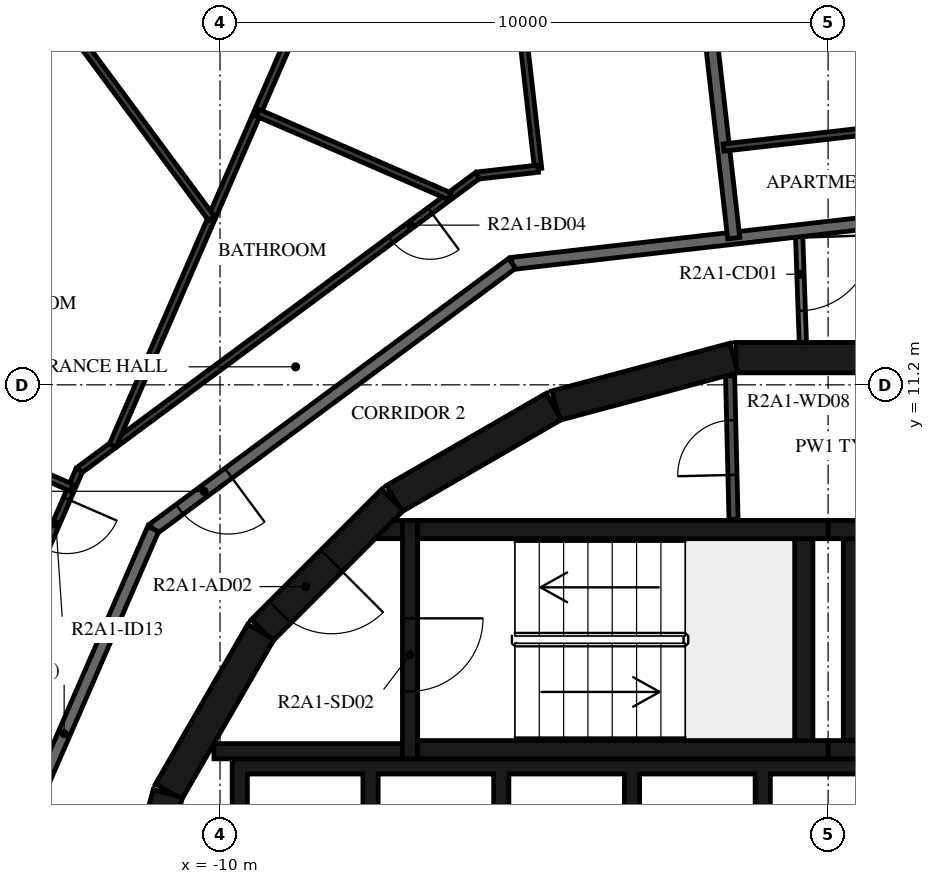
"""IFC4 building model, lengths in metres.
Left out: names, types, materials, properties, quantities, classifications, styles, units other than length and angle.
Written with IfcOpenShell. Run it as: python <this file> out.ifc"""

import sys

from ifc_helpers import new_model, si_unit, direction, frame, frame_2d, origin, place, context, subcontext, project, spatial, polyline, rectangle, outline, extrude, element, fill, save


model = new_model("IFC4")
c1 = context("Model", 3, precision=1e-05, world=origin(), true_north=direction((0.0, 1.0)))
c2 = subcontext(c1, "Body", "Model", "MODEL_VIEW")
j1 = project(units=[si_unit("LENGTHUNIT", "METRE"), si_unit("PLANEANGLEUNIT", "RADIAN")], contexts=[c1])
p1 = place(None, origin())
s1 = spatial("IfcSite", under=j1, at=p1, CompositionType="ELEMENT")
p2 = place(p1, origin())
s2 = spatial("IfcBuilding", under=s1, at=p2, CompositionType="ELEMENT")
p3 = place(p2, frame((0.0, 0.0, 80.2)))
s3 = spatial("IfcBuildingStorey", under=s2, at=p3, CompositionType="ELEMENT", Elevation=80.2)
for number, where, z_axis, x_axis in (
    (1, (1.516, 11.647, 0.0), (0.0, 0.0, 1.0), (-1.0, 0.0, 0.0)),
    (2, (-1.55, 11.643, 0.0), (0.0, 0.0, 1.0), (-0.966, -0.259, 0.0)),
    (3, (-4.51, 10.845, 0.0), (0.0, 0.0, 1.0), (-0.866, -0.5, 0.0)),
):
    element("IfcWall", number, at=place(p3, frame(where, z_axis=z_axis, x_axis=x_axis)), inside=s3, PredefinedType="SHEAR", context=c2, shape_type="SweptSolid", body=[
        extrude(rectangle(XDim=3.033, YDim=0.5, at=frame_2d((1.516, 0.0))), origin(), (0.0, 0.0, 1.0), 3.12),
    ])
p4 = place(p3, frame((-7.164, 9.308, 0.0), z_axis=(0.0, 0.0, 1.0), x_axis=(-0.707106781187, -0.707106781187, 0.0)))
e4 = element("IfcWall", 4, at=p4, inside=s3, PredefinedType="SHEAR", context=c2, shape_type="SweptSolid", body=[
    extrude(rectangle(XDim=3.032, YDim=0.5, at=frame_2d((1.516, 0.0))), origin(), (0.0, 0.0, 1.0), 3.12),
])
p5 = place(p4, frame((1.416, 0.0, 0.0)))
e5 = element("IfcOpeningElement", 5, at=p5, cuts=e4, PredefinedType="OPENING", context=c2, shape_type="SweptSolid", body=[
    extrude(rectangle(XDim=1.2, YDim=2.1, at=frame_2d((0.6, 1.05))), frame((0.0, 0.26, 0.0), z_axis=(0.0, -1.0, 0.0), x_axis=(1.0, 0.0, 0.0)), (0.0, 0.0, 1.0), 0.52),
])
for number, where, z_axis, x_axis in (
    (6, (-9.329, 7.137, 0.0), (0.0, 0.0, 1.0), (-0.5, -0.866, 0.0)),
    (7, (-10.858, 4.479, 0.0), (0.0, 0.0, 1.0), (-0.259, -0.966, 0.0)),
):
    element("IfcWall", number, at=place(p3, frame(where, z_axis=z_axis, x_axis=x_axis)), inside=s3, PredefinedType="SHEAR", context=c2, shape_type="SweptSolid", body=[
        extrude(rectangle(XDim=3.033, YDim=0.5, at=frame_2d((1.516, 0.0))), origin(), (0.0, 0.0, 1.0), 3.12),
    ])
for number, where, z_axis, x_axis in (
    (8, (0.0, 5.2, 0.0), (0.0, 0.0, 1.0), (1.0, 0.0, 0.0)),
    (9, (0.0, 8.82, 0.0), (0.0, 0.0, 1.0), (1.0, 0.0, 0.0)),
):
    element("IfcWall", number, at=place(p3, frame(where, z_axis=z_axis, x_axis=x_axis)), inside=s3, PredefinedType="SHEAR", context=c2, shape_type="SweptSolid", body=[
        extrude(rectangle(XDim=6.75, YDim=0.3, at=frame_2d((3.375, 0.0))), origin(), (0.0, 0.0, 1.0), 3.12),
    ])
p6 = place(p3, frame((0.4, 5.35, 0.0), z_axis=(0.0, 0.0, 1.0), x_axis=(0.0, 1.0, 0.0)))
e10 = element("IfcWall", 10, at=p6, inside=s3, PredefinedType="SHEAR", context=c2, shape_type="SweptSolid", body=[
    extrude(rectangle(XDim=3.32, YDim=0.3, at=frame_2d((1.66, 0.0))), origin(), (0.0, 0.0, 1.0), 3.12),
])
for number, where, z_axis, x_axis in (
    (11, (-6.75, 5.2, 0.0), (0.0, 0.0, 1.0), (1.0, 0.0, 0.0)),
    (12, (-6.75, 8.82, 0.0), (0.0, 0.0, 1.0), (1.0, 0.0, 0.0)),
):
    element("IfcWall", number, at=place(p3, frame(where, z_axis=z_axis, x_axis=x_axis)), inside=s3, PredefinedType="SHEAR", context=c2, shape_type="SweptSolid", body=[
        extrude(rectangle(XDim=6.75, YDim=0.3, at=frame_2d((3.375, 0.0))), origin(), (0.0, 0.0, 1.0), 3.12),
    ])
p7 = place(p3, frame((-0.4, 5.35, 0.0), z_axis=(0.0, 0.0, 1.0), x_axis=(0.0, 1.0, 0.0)))
e13 = element("IfcWall", 13, at=p7, inside=s3, PredefinedType="SHEAR", context=c2, shape_type="SweptSolid", body=[
    extrude(rectangle(XDim=3.32, YDim=0.3, at=frame_2d((1.66, 0.0))), origin(), (0.0, 0.0, 1.0), 3.12),
])
p8 = place(p3, frame((-6.875, 8.97, 0.0), z_axis=(0.0, 0.0, 1.0), x_axis=(0.0, -1.0, 0.0)))
e14 = element("IfcWall", 14, at=p8, inside=s3, PredefinedType="SHEAR", context=c2, shape_type="SweptSolid", body=[
    extrude(rectangle(XDim=3.92, YDim=0.25, at=frame_2d((1.96, 0.0))), origin(), (0.0, 0.0, 1.0), 3.12),
])
p9 = place(p8, frame((1.61, 0.0, 0.0)))
e15 = element("IfcOpeningElement", 15, at=p9, cuts=e14, PredefinedType="OPENING", context=c2, shape_type="SweptSolid", body=[
    extrude(rectangle(XDim=1.2, YDim=2.1, at=frame_2d((0.6, 1.05))), frame((0.0, 0.135, 0.0), z_axis=(0.0, -1.0, 0.0), x_axis=(1.0, 0.0, 0.0)), (0.0, 0.0, 1.0), 0.27),
])
p10 = place(p3, frame((-7.0, 5.175, 0.0), z_axis=(0.0, 0.0, 1.0), x_axis=(-1.0, 0.0, 0.0)))
e16 = element("IfcWall", 16, at=p10, inside=s3, PredefinedType="SHEAR", context=c2, shape_type="SweptSolid", body=[
    extrude(rectangle(XDim=3.1, YDim=0.25, at=frame_2d((1.55, 0.0))), origin(), (0.0, 0.0, 1.0), 3.12),
])
p11 = place(p3, origin())
e17 = element("IfcWall", 17, at=p11, inside=s3, PredefinedType="SHEAR", context=c2, shape_type="SweptSolid", body=[
    extrude(outline(polyline([(-7.148, 8.97), (-7.0, 8.97), (-7.0, 8.67), (-7.448, 8.67), (-7.148, 8.97)])), origin(), (0.0, 0.0, 1.0), 3.12),
])
p12 = place(p3, origin())
e18 = element("IfcWall", 18, at=p12, inside=s3, PredefinedType="SHEAR", context=c2, shape_type="SweptSolid", body=[
    extrude(outline(polyline([(-9.55, 4.8), (-7.65, 4.8), (-7.65, 1.9), (-7.4, 1.9), (-7.4, 4.8), (-5.5, 4.8), (-5.5, 1.9), (-5.25, 1.9), (-5.25, 4.8), (-3.35, 4.8), (-3.35, 1.9), (-3.1, 1.9), (-3.1, 4.8), (-1.2, 4.8), (-1.2, 1.9), (-0.95, 1.9), (-0.95, 4.8), (3.1, 4.8), (3.1, 1.9), (3.35, 1.9), (3.35, 4.8), (5.25, 4.8), (5.25, 1.9), (5.5, 1.9), (5.5, 4.8), (7.4, 4.8), (7.4, 1.9), (7.65, 1.9), (7.65, 4.8), (9.55, 4.8), (9.55, 1.9), (9.8, 1.9), (9.8, 4.8), (9.8, 5.05), (-9.8, 5.05), (-9.8, 4.8), (-9.8, 1.9), (-9.55, 1.9), (-9.55, 4.8)])), origin(), (0.0, 0.0, 1.0), 3.12),
])
p13 = place(p3, frame((-1.555, 8.99, 0.0), z_axis=(0.0, 0.0, 1.0), x_axis=(-0.024125549686, 0.999708936567, 0.0)))
e19 = element("IfcWall", 19, at=p13, inside=s3, PredefinedType="PARTITIONING", context=c2, shape_type="SweptSolid", body=[
    extrude(rectangle(XDim=2.358, YDim=0.15, at=frame_2d((1.179, 0.0))), origin(), (0.0, 0.0, 1.0), 3.12),
])
p14 = place(p13, frame((0.729, 0.0, 0.0)))
e20 = element("IfcOpeningElement", 20, at=p14, cuts=e19, PredefinedType="OPENING", context=c2, shape_type="SweptSolid", body=[
    extrude(rectangle(XDim=0.9, YDim=2.1, at=frame_2d((0.45, 1.05))), frame((0.0, 0.085, 0.0), z_axis=(0.0, -1.0, 0.0), x_axis=(1.0, 0.0, 0.0)), (0.0, 0.0, 1.0), 0.17),
])
p15 = place(p3, frame((-0.479, 13.734, 0.0), z_axis=(0.0, 0.0, 1.0), x_axis=(0.034805430832, -0.999394107439, 0.0)))
e21 = element("IfcWall", 21, at=p15, inside=s3, PredefinedType="PARTITIONING", context=c2, shape_type="SweptSolid", body=[
    extrude(rectangle(XDim=1.838, YDim=0.12, at=frame_2d((0.919, 0.0))), origin(), (0.0, 0.0, 1.0), 3.12),
])
p16 = place(p15, frame((0.115, 0.0, 0.0)))
e22 = element("IfcOpeningElement", 22, at=p16, cuts=e21, PredefinedType="OPENING", context=c2, shape_type="SweptSolid", body=[
    extrude(rectangle(XDim=1.2, YDim=2.1, at=frame_2d((0.6, 1.05))), frame((0.0, 0.07, 0.0), z_axis=(0.0, -1.0, 0.0), x_axis=(1.0, 0.0, 0.0)), (0.0, 0.0, 1.0), 0.14),
])
p17 = place(p3, frame((2.096, 14.028, 0.0), z_axis=(0.0, 0.0, 1.0), x_axis=(-0.993569170114, -0.113226782163, 0.0)))
e23 = element("IfcWall", 23, at=p17, inside=s3, PredefinedType="STANDARD", context=c2, shape_type="SweptSolid", body=[
    extrude(rectangle(XDim=7.342, YDim=0.2, at=frame_2d((3.671, 0.0))), origin(), (0.0, 0.0, 1.0), 3.12),
])
p18 = place(p3, frame((-5.198, 13.196, 0.0), z_axis=(0.0, 0.0, 1.0), x_axis=(-0.803869883159, -0.594805187394, 0.0)))
e24 = element("IfcWall", 24, at=p18, inside=s3, PredefinedType="STANDARD", context=c2, shape_type="SweptSolid", body=[
    extrude(rectangle(XDim=7.342, YDim=0.2, at=frame_2d((3.671, 0.0))), origin(), (0.0, 0.0, 1.0), 3.12),
])
p19 = place(p18, frame((5.8, 0.0, 0.0)))
e25 = element("IfcOpeningElement", 25, at=p19, cuts=e24, PredefinedType="OPENING", context=c2, shape_type="SweptSolid", body=[
    extrude(rectangle(XDim=1.0, YDim=2.1, at=frame_2d((0.5, 1.05))), frame((0.0, 0.11, 0.0), z_axis=(0.0, -1.0, 0.0), x_axis=(1.0, 0.0, 0.0)), (0.0, 0.0, 1.0), 0.22),
])
p20 = place(p3, frame((-11.1, 8.829, 0.0), z_axis=(0.0, 0.0, 1.0), x_axis=(-0.398741918631, -0.917063183388, 0.0)))
e26 = element("IfcWall", 26, at=p20, inside=s3, PredefinedType="STANDARD", context=c2, shape_type="SweptSolid", body=[
    extrude(rectangle(XDim=7.342, YDim=0.2, at=frame_2d((3.671, 0.0))), origin(), (0.0, 0.0, 1.0), 3.12),
])
p21 = place(p3, frame((-2.385, 20.92, 0.0), z_axis=(0.0, 0.0, 1.0), x_axis=(0.113177776247, -0.993574753586, 0.0)))
e27 = element("IfcWall", 27, at=p21, inside=s3, PredefinedType="STANDARD", context=c2, shape_type="SweptSolid", body=[
    extrude(rectangle(XDim=7.356, YDim=0.2, at=frame_2d((3.678, 0.0))), origin(), (0.0, 0.0, 1.0), 3.12),
])
p22 = place(p3, frame((2.326, 15.563, 0.0), z_axis=(0.0, 0.0, 1.0), x_axis=(-0.993575109804, -0.113174649008, 0.0)))
e28 = element("IfcWall", 28, at=p22, inside=s3, PredefinedType="PARTITIONING", context=c2, shape_type="SweptSolid", body=[
    extrude(rectangle(XDim=4.073, YDim=0.12, at=frame_2d((2.036, 0.0))), origin(), (0.0, 0.0, 1.0), 3.12),
])
p23 = place(p3, frame((0.498, 24.306, 0.0), z_axis=(0.0, 0.0, 1.0), x_axis=(0.594826266513, -0.803854285718, 0.0)))
e29 = element("IfcWall", 29, at=p23, inside=s3, PredefinedType="PARTITIONING", context=c2, shape_type="SweptSolid", body=[
    extrude(rectangle(XDim=11.875, YDim=0.12, at=frame_2d((5.938, 0.0))), origin(), (0.0, 0.0, 1.0), 3.12),
])
p24 = place(p23, frame((8.26, 0.0, 0.0)))
e30 = element("IfcOpeningElement", 30, at=p24, cuts=e29, PredefinedType="OPENING", context=c2, shape_type="SweptSolid", body=[
    extrude(rectangle(XDim=0.9, YDim=2.1, at=frame_2d((0.45, 1.05))), frame((0.0, 0.07, 0.0), z_axis=(0.0, -1.0, 0.0), x_axis=(1.0, 0.0, 0.0)), (0.0, 0.0, 1.0), 0.14),
])
p25 = place(p23, frame((3.094, 0.0, 0.0)))
e31 = element("IfcOpeningElement", 31, at=p25, cuts=e29, PredefinedType="OPENING", context=c2, shape_type="SweptSolid", body=[
    extrude(rectangle(XDim=0.9, YDim=2.1, at=frame_2d((0.45, 1.05))), frame((0.0, 0.07, 0.0), z_axis=(0.0, -1.0, 0.0), x_axis=(1.0, 0.0, 0.0)), (0.0, 0.0, 1.0), 0.14),
])
p26 = place(p3, frame((-5.584, 21.908, 0.0), z_axis=(0.0, 0.0, 1.0), x_axis=(0.113192725021, -0.993573050662, 0.0)))
e32 = element("IfcWall", 32, at=p26, inside=s3, PredefinedType="PARTITIONING", context=c2, shape_type="SweptSolid", body=[
    extrude(rectangle(XDim=7.2, YDim=0.12, at=frame_2d((3.6, 0.0))), origin(), (0.0, 0.0, 1.0), 3.12),
])
p27 = place(p26, frame((0.12, 0.0, 0.0)))
e33 = element("IfcOpeningElement", 33, at=p27, cuts=e32, PredefinedType="OPENING", context=c2, shape_type="SweptSolid", body=[
    extrude(rectangle(XDim=0.9, YDim=2.1, at=frame_2d((0.45, 1.05))), frame((0.0, 0.07, 0.0), z_axis=(0.0, -1.0, 0.0), x_axis=(1.0, 0.0, 0.0)), (0.0, 0.0, 1.0), 0.14),
])
p28 = place(p26, frame((1.658, 0.0, 0.0)))
e34 = element("IfcOpeningElement", 34, at=p28, cuts=e32, PredefinedType="OPENING", context=c2, shape_type="SweptSolid", body=[
    extrude(rectangle(XDim=0.9, YDim=2.1, at=frame_2d((0.45, 1.05))), frame((0.0, 0.07, 0.0), z_axis=(0.0, -1.0, 0.0), x_axis=(1.0, 0.0, 0.0)), (0.0, 0.0, 1.0), 0.14),
])
p29 = place(p3, frame((-4.769, 14.755, 0.0), z_axis=(0.0, 0.0, 1.0), x_axis=(-0.993568649539, -0.113231350131, 0.0)))
e35 = element("IfcWall", 35, at=p29, inside=s3, PredefinedType="PARTITIONING", context=c2, shape_type="SweptSolid", body=[
    extrude(rectangle(XDim=1.005, YDim=0.12, at=frame_2d((0.502, 0.0))), origin(), (0.0, 0.0, 1.0), 3.12),
])
p30 = place(p3, frame((-5.767, 14.641, 0.0), z_axis=(0.0, 0.0, 1.0), x_axis=(-0.803853364238, -0.594827511807, 0.0)))
e36 = element("IfcWall", 36, at=p30, inside=s3, PredefinedType="PARTITIONING", context=c2, shape_type="SweptSolid", body=[
    extrude(rectangle(XDim=8.146, YDim=0.12, at=frame_2d((4.073, 0.0))), origin(), (0.0, 0.0, 1.0), 3.12),
])
p31 = place(p30, frame((0.97, 0.0, 0.0)))
e37 = element("IfcOpeningElement", 37, at=p31, cuts=e36, PredefinedType="OPENING", context=c2, shape_type="SweptSolid", body=[
    extrude(rectangle(XDim=0.8, YDim=2.1, at=frame_2d((0.4, 1.05))), frame((0.0, 0.07, 0.0), z_axis=(0.0, -1.0, 0.0), x_axis=(1.0, 0.0, 0.0)), (0.0, 0.0, 1.0), 0.14),
])
p32 = place(p3, frame((-12.315, 9.796, 0.0), z_axis=(0.0, 0.0, 1.0), x_axis=(-0.398790200406, -0.917042188812, 0.0)))
e38 = element("IfcWall", 38, at=p32, inside=s3, PredefinedType="PARTITIONING", context=c2, shape_type="SweptSolid", body=[
    extrude(rectangle(XDim=2.646, YDim=0.12, at=frame_2d((1.323, 0.0))), origin(), (0.0, 0.0, 1.0), 3.12),
])
p33 = place(p32, frame((0.513, 0.0, 0.0)))
e39 = element("IfcOpeningElement", 39, at=p33, cuts=e38, PredefinedType="OPENING", context=c2, shape_type="SweptSolid", body=[
    extrude(rectangle(XDim=0.9, YDim=2.1, at=frame_2d((0.45, 1.05))), frame((0.0, 0.07, 0.0), z_axis=(0.0, -1.0, 0.0), x_axis=(1.0, 0.0, 0.0)), (0.0, 0.0, 1.0), 0.14),
])
p34 = place(p3, frame((-5.952, 23.571, 0.0), z_axis=(0.0, 0.0, 1.0), x_axis=(-0.398745097158, -0.917061801348, 0.0)))
e40 = element("IfcWall", 40, at=p34, inside=s3, PredefinedType="PARTITIONING", context=c2, shape_type="SweptSolid", body=[
    extrude(rectangle(XDim=14.576, YDim=0.12, at=frame_2d((7.288, 0.0))), origin(), (0.0, 0.0, 1.0), 3.12),
])
p35 = place(p34, frame((2.801, 0.0, 0.0)))
e41 = element("IfcOpeningElement", 41, at=p35, cuts=e40, PredefinedType="OPENING", context=c2, shape_type="SweptSolid", body=[
    extrude(rectangle(XDim=0.9, YDim=2.1, at=frame_2d((0.45, 1.05))), frame((0.0, 0.07, 0.0), z_axis=(0.0, -1.0, 0.0), x_axis=(1.0, 0.0, 0.0)), (0.0, 0.0, 1.0), 0.14),
])
p36 = place(p34, frame((1.405, 0.0, 0.0)))
e42 = element("IfcOpeningElement", 42, at=p36, cuts=e40, PredefinedType="OPENING", context=c2, shape_type="SweptSolid", body=[
    extrude(rectangle(XDim=0.9, YDim=2.1, at=frame_2d((0.45, 1.05))), frame((0.0, 0.07, 0.0), z_axis=(0.0, -1.0, 0.0), x_axis=(1.0, 0.0, 0.0)), (0.0, 0.0, 1.0), 0.14),
])
p37 = place(p3, frame((-9.385, 15.676, 0.0), z_axis=(0.0, 0.0, 1.0), x_axis=(0.917068929701, -0.398728702475, 0.0)))
e43 = element("IfcWall", 43, at=p37, inside=s3, PredefinedType="PARTITIONING", context=c2, shape_type="SweptSolid", body=[
    extrude(rectangle(XDim=3.445, YDim=0.12, at=frame_2d((1.723, 0.0))), origin(), (0.0, 0.0, 1.0), 3.12),
])
p38 = place(p3, frame((-13.163, 18.022, 0.0), z_axis=(0.0, 0.0, 1.0), x_axis=(0.594797671626, -0.803875444226, 0.0)))
e44 = element("IfcWall", 44, at=p38, inside=s3, PredefinedType="PARTITIONING", context=c2, shape_type="SweptSolid", body=[
    extrude(rectangle(XDim=5.081, YDim=0.12, at=frame_2d((2.54, 0.0))), origin(), (0.0, 0.0, 1.0), 3.12),
])
p39 = place(p38, frame((0.4, 0.0, 0.0)))
e45 = element("IfcOpeningElement", 45, at=p39, cuts=e44, PredefinedType="OPENING", context=c2, shape_type="SweptSolid", body=[
    extrude(rectangle(XDim=0.9, YDim=2.1, at=frame_2d((0.45, 1.05))), frame((0.0, 0.07, 0.0), z_axis=(0.0, -1.0, 0.0), x_axis=(1.0, 0.0, 0.0)), (0.0, 0.0, 1.0), 0.14),
])
p40 = place(p3, frame((-16.161, 11.126, 0.0), z_axis=(0.0, 0.0, 1.0), x_axis=(0.91705953326, -0.398750313425, 0.0)))
e46 = element("IfcWall", 46, at=p40, inside=s3, PredefinedType="PARTITIONING", context=c2, shape_type="SweptSolid", body=[
    extrude(rectangle(XDim=4.057, YDim=0.12, at=frame_2d((2.029, 0.0))), origin(), (0.0, 0.0, 1.0), 2.73),
])
p41 = place(p9, origin())
e47 = element("IfcDoor", 47, at=p41, inside=s3, OperationType="SINGLE_SWING_LEFT", PredefinedType="DOOR", context=c2, shape_type="SweptSolid", body=[
    extrude(rectangle(XDim=1.2, YDim=2.1, at=frame_2d((0.6, 1.05))), frame((0.0, 0.025, 0.0), z_axis=(0.0, -1.0, 0.0), x_axis=(1.0, 0.0, 0.0)), (0.0, 0.0, 1.0), 0.05),
])
fill(e15, e47)
p42 = place(p5, origin())
e48 = element("IfcDoor", 48, at=p42, inside=s3, OperationType="SINGLE_SWING_RIGHT", PredefinedType="DOOR", context=c2, shape_type="SweptSolid", body=[
    extrude(rectangle(XDim=1.2, YDim=2.1, at=frame_2d((0.6, 1.05))), frame((0.0, 0.025, 0.0), z_axis=(0.0, -1.0, 0.0), x_axis=(1.0, 0.0, 0.0)), (0.0, 0.0, 1.0), 0.05),
])
fill(e5, e48)
p43 = place(p14, origin())
e49 = element("IfcDoor", 49, at=p43, inside=s3, OperationType="SINGLE_SWING_LEFT", PredefinedType="DOOR", context=c2, shape_type="SweptSolid", body=[
    extrude(rectangle(XDim=0.9, YDim=2.1, at=frame_2d((0.45, 1.05))), frame((0.0, 0.025, 0.0), z_axis=(0.0, -1.0, 0.0), x_axis=(1.0, 0.0, 0.0)), (0.0, 0.0, 1.0), 0.05),
])
fill(e20, e49)
p44 = place(p19, origin())
e50 = element("IfcDoor", 50, at=p44, inside=s3, OperationType="SINGLE_SWING_LEFT", PredefinedType="DOOR", context=c2, shape_type="SweptSolid", body=[
    extrude(rectangle(XDim=1.0, YDim=2.1, at=frame_2d((0.5, 1.05))), frame((0.0, 0.025, 0.0), z_axis=(0.0, -1.0, 0.0), x_axis=(1.0, 0.0, 0.0)), (0.0, 0.0, 1.0), 0.05),
])
fill(e25, e50)
p45 = place(p31, origin())
e51 = element("IfcDoor", 51, at=p45, inside=s3, OperationType="SINGLE_SWING_LEFT", PredefinedType="DOOR", context=c2, shape_type="SweptSolid", body=[
    extrude(rectangle(XDim=0.8, YDim=2.1, at=frame_2d((0.4, 1.05))), frame((0.0, 0.025, 0.0), z_axis=(0.0, -1.0, 0.0), x_axis=(1.0, 0.0, 0.0)), (0.0, 0.0, 1.0), 0.05),
])
fill(e37, e51)
p46 = place(p33, origin())
e52 = element("IfcDoor", 52, at=p46, inside=s3, OperationType="SINGLE_SWING_LEFT", PredefinedType="DOOR", context=c2, shape_type="SweptSolid", body=[
    extrude(rectangle(XDim=0.9, YDim=2.1, at=frame_2d((0.45, 1.05))), frame((0.0, 0.025, 0.0), z_axis=(0.0, -1.0, 0.0), x_axis=(1.0, 0.0, 0.0)), (0.0, 0.0, 1.0), 0.05),
])
fill(e39, e52)
p47 = place(p16, origin())
e53 = element("IfcDoor", 53, at=p47, inside=s3, OperationType="DOUBLE_DOOR_SINGLE_SWING", PredefinedType="DOOR", context=c2, shape_type="SweptSolid", body=[
    extrude(rectangle(XDim=1.2, YDim=2.1, at=frame_2d((0.6, 1.05))), frame((0.0, 0.025, 0.0), z_axis=(0.0, -1.0, 0.0), x_axis=(1.0, 0.0, 0.0)), (0.0, 0.0, 1.0), 0.05),
])
fill(e22, e53)
save(model, sys.argv[1])
